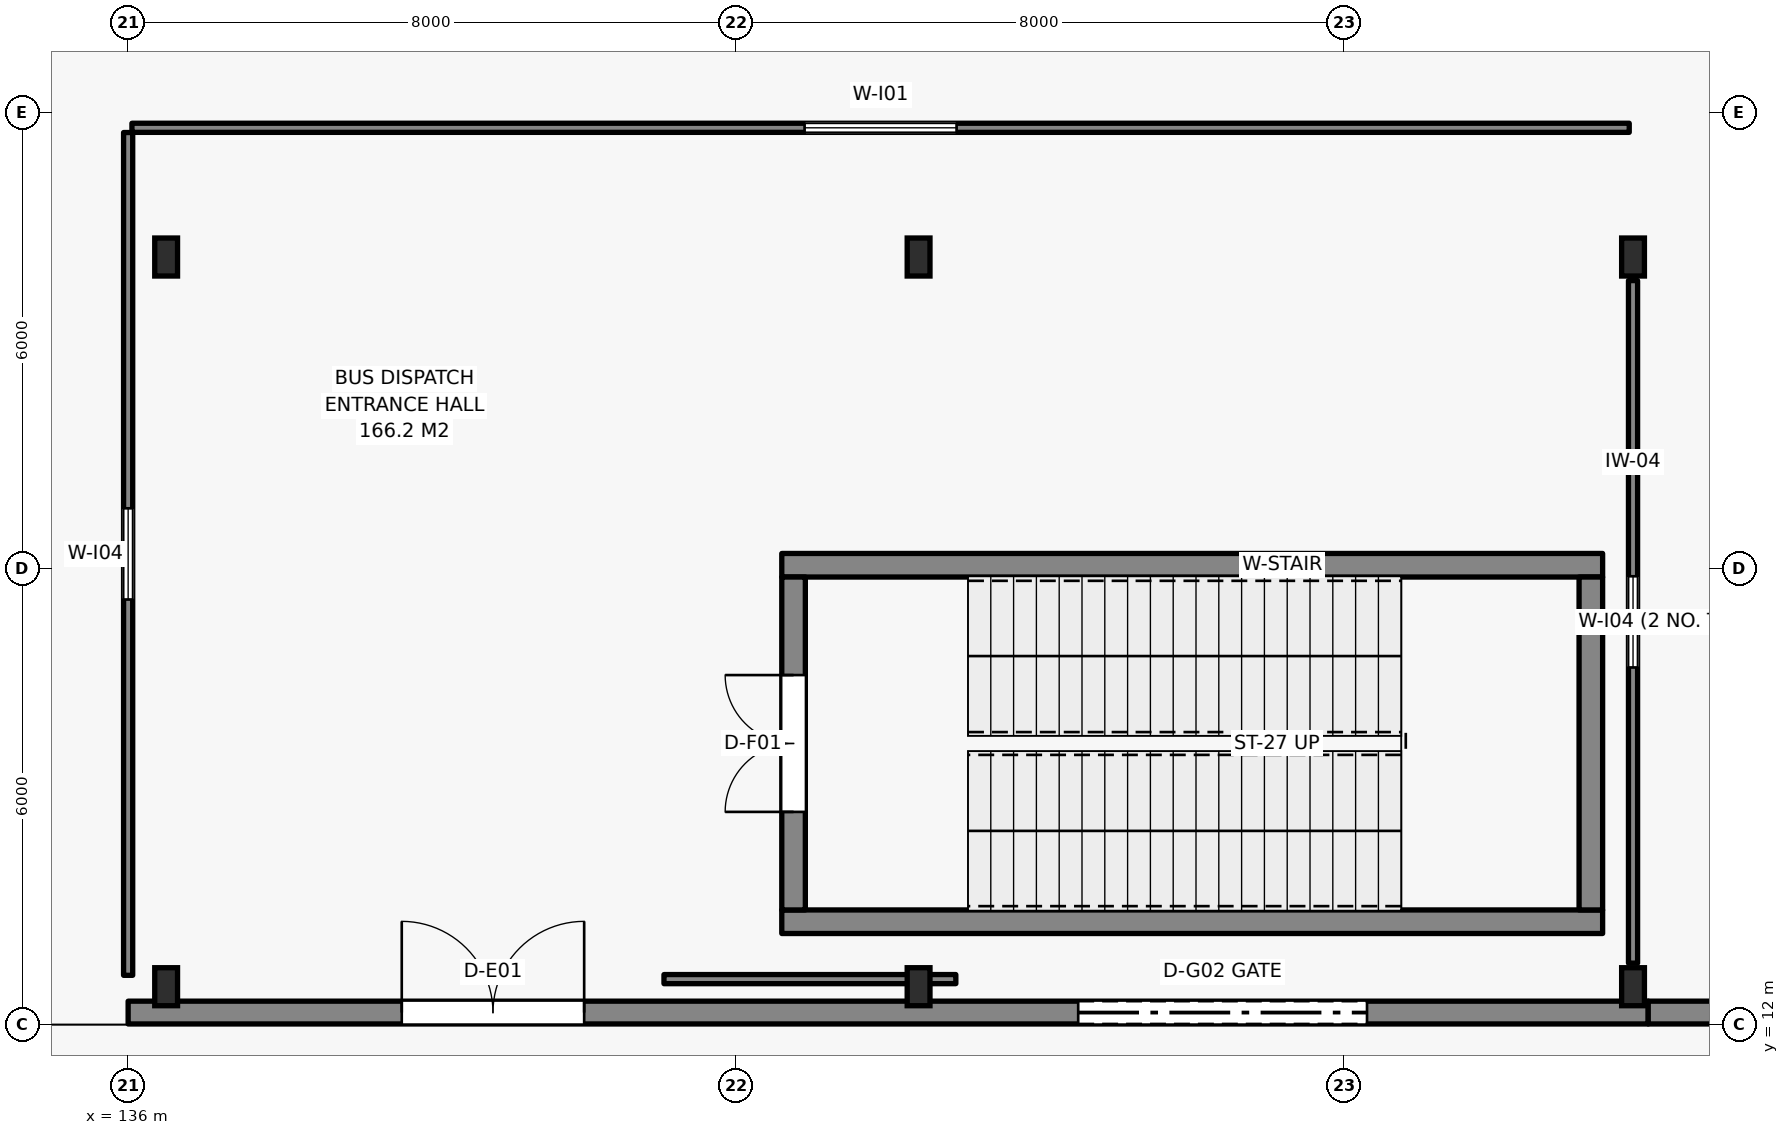
"""IFC4 building model, lengths in metres.
Left out: names, types, materials, properties, quantities, classifications, styles, units other than length and angle.
Written with IfcOpenShell. Run it as: python <this file> out.ifc"""

import sys

from ifc_helpers import new_model, si_unit, direction, frame, frame_2d, origin, origin_2d, place, context, subcontext, project, spatial, rectangle, i_section, extrude, element, fill, save


model = new_model("IFC4")
c1 = context("Model", 3, precision=1e-05, world=origin(), true_north=direction((0.0, 1.0)))
c2 = subcontext(c1, "Body", "Model", "MODEL_VIEW")
j1 = project(units=[si_unit("LENGTHUNIT", "METRE"), si_unit("PLANEANGLEUNIT", "RADIAN")], contexts=[c1])
p1 = place(None, origin())
s1 = spatial("IfcSite", under=j1, at=p1, CompositionType="ELEMENT")
p2 = place(p1, origin())
s2 = spatial("IfcBuilding", under=s1, at=p2, CompositionType="ELEMENT")
p3 = place(p2, origin())
s3 = spatial("IfcBuildingStorey", under=s2, at=p3, CompositionType="ELEMENT", Elevation=0.0)
for number, where, z_axis, x_axis in (
    (1, (144.6, 13.355, -0.4), (0.0, 0.0, 1.0), (1.0, 0.0, 0.0)),
    (2, (144.6, 18.045, -0.4), (0.0, 0.0, 1.0), (1.0, 0.0, 0.0)),
):
    element("IfcWall", number, at=place(p3, frame(where, z_axis=z_axis, x_axis=x_axis)), inside=s3, PredefinedType="SHEAR", context=c2, shape_type="SweptSolid", body=[
        extrude(rectangle(XDim=10.8, YDim=0.31, at=frame_2d((5.4, 0.0))), origin(), (0.0, 0.0, 1.0), 6.15),
    ])
p4 = place(p3, frame((144.755, 13.51, -0.4), z_axis=(0.0, 0.0, 1.0), x_axis=(0.0, 1.0, 0.0)))
e3 = element("IfcWall", 3, at=p4, inside=s3, PredefinedType="SHEAR", context=c2, shape_type="SweptSolid", body=[
    extrude(rectangle(XDim=4.38, YDim=0.31, at=frame_2d((2.19, 0.0))), origin(), (0.0, 0.0, 1.0), 6.15),
])
p5 = place(p4, frame((1.29, 0.0, 0.4)))
e4 = element("IfcOpeningElement", 4, at=p5, cuts=e3, PredefinedType="OPENING", context=c2, shape_type="SweptSolid", body=[
    extrude(rectangle(XDim=1.8, YDim=2.15, at=frame_2d((0.9, 1.075))), frame((0.0, 0.165, 0.0), z_axis=(0.0, -1.0, 0.0), x_axis=(1.0, 0.0, 0.0)), (0.0, 0.0, 1.0), 0.33),
])
p6 = place(p3, frame((155.245, 13.51, -0.4), z_axis=(0.0, 0.0, 1.0), x_axis=(0.0, 1.0, 0.0)))
e5 = element("IfcWall", 5, at=p6, inside=s3, PredefinedType="SHEAR", context=c2, shape_type="SweptSolid", body=[
    extrude(rectangle(XDim=4.38, YDim=0.31, at=frame_2d((2.19, 0.0))), origin(), (0.0, 0.0, 1.0), 6.15),
])
for number, where, z_axis, x_axis in (
    (6, (136.5, 12.5, -0.4), (0.0, 0.0, 1.0), (1.0, 0.0, 0.0)),
    (7, (136.5, 22.1, -0.4), (0.0, 0.0, 1.0), (1.0, 0.0, 0.0)),
    (8, (146.4, 12.5, -0.4), (0.0, 0.0, 1.0), (1.0, 0.0, 0.0)),
    (9, (146.4, 22.1, -0.4), (0.0, 0.0, 1.0), (1.0, 0.0, 0.0)),
    (10, (155.8, 12.5, -0.4), (0.0, 0.0, 1.0), (1.0, 0.0, 0.0)),
    (11, (155.8, 22.1, -0.4), (0.0, 0.0, 1.0), (1.0, 0.0, 0.0)),
):
    element("IfcColumn", number, at=place(p3, frame(where, z_axis=z_axis, x_axis=x_axis)), inside=s3, PredefinedType="COLUMN", context=c2, shape_type="SweptSolid", body=[
        extrude(i_section(OverallWidth=0.3, OverallDepth=0.5, WebThickness=0.014, FlangeThickness=0.028, FilletRadius=0.027, at=origin_2d()), origin(), (0.0, 0.0, 1.0), 6.4),
    ])
p7 = place(p3, frame((136.0, 12.16, 0.0), z_axis=(0.0, 0.0, 1.0), x_axis=(1.0, 0.0, 0.0)))
e12 = element("IfcWall", 12, at=p7, inside=s3, PredefinedType="SOLIDWALL", context=c2, shape_type="SweptSolid", body=[
    extrude(rectangle(XDim=20.0, YDim=0.3, at=frame_2d((10.0, 0.0))), origin(), (0.0, 0.0, 1.0), 5.74),
])
p8 = place(p7, frame((3.6, 0.0, 0.0)))
e13 = element("IfcOpeningElement", 13, at=p8, cuts=e12, PredefinedType="OPENING", context=c2, shape_type="SweptSolid", body=[
    extrude(rectangle(XDim=2.4, YDim=2.5, at=frame_2d((1.2, 1.25))), frame((0.0, 0.16, 0.0), z_axis=(0.0, -1.0, 0.0), x_axis=(1.0, 0.0, 0.0)), (0.0, 0.0, 1.0), 0.32),
])
p9 = place(p7, frame((12.5, 0.0, 0.0)))
e14 = element("IfcOpeningElement", 14, at=p9, cuts=e12, PredefinedType="OPENING", context=c2, shape_type="SweptSolid", body=[
    extrude(rectangle(XDim=3.8, YDim=3.7, at=frame_2d((1.9, 1.85))), frame((0.0, 0.16, 0.0), z_axis=(0.0, -1.0, 0.0), x_axis=(1.0, 0.0, 0.0)), (0.0, 0.0, 1.0), 0.32),
])
p10 = place(p3, frame((156.0, 12.16, 0.0), z_axis=(0.0, 0.0, 1.0), x_axis=(1.0, 0.0, 0.0)))
e15 = element("IfcWall", 15, at=p10, inside=s3, PredefinedType="SOLIDWALL", context=c2, shape_type="SweptSolid", body=[
    extrude(rectangle(XDim=8.0, YDim=0.3, at=frame_2d((4.0, 0.0))), origin(), (0.0, 0.0, 1.0), 5.74),
])
p11 = place(p10, frame((1.8, 0.0, 0.0)))
e16 = element("IfcOpeningElement", 16, at=p11, cuts=e15, PredefinedType="OPENING", context=c2, shape_type="SweptSolid", body=[
    extrude(rectangle(XDim=4.4, YDim=4.1, at=frame_2d((2.2, 2.05))), frame((0.0, 0.16, 0.0), z_axis=(0.0, -1.0, 0.0), x_axis=(1.0, 0.0, 0.0)), (0.0, 0.0, 1.0), 0.32),
])
p12 = place(p3, frame((143.05, 12.6, 0.0), z_axis=(0.0, 0.0, 1.0), x_axis=(1.0, 0.0, 0.0)))
e17 = element("IfcWall", 17, at=p12, inside=s3, PredefinedType="PARTITIONING", context=c2, shape_type="SweptSolid", body=[
    extrude(rectangle(XDim=3.84, YDim=0.12, at=frame_2d((1.92, 0.0))), origin(), (0.0, 0.0, 1.0), 4.925),
])
p13 = place(p3, frame((155.8, 12.81, 0.0), z_axis=(0.0, 0.0, 1.0), x_axis=(0.0, 1.0, 0.0)))
e18 = element("IfcWall", 18, at=p13, inside=s3, PredefinedType="PARTITIONING", context=c2, shape_type="SweptSolid", body=[
    extrude(rectangle(XDim=8.98, YDim=0.12, at=frame_2d((4.49, 0.0))), origin(), (0.0, 0.0, 1.0), 4.825),
])
p14 = place(p13, frame((3.89, 0.0, 1.05)))
e19 = element("IfcOpeningElement", 19, at=p14, cuts=e18, PredefinedType="OPENING", context=c2, shape_type="SweptSolid", body=[
    extrude(rectangle(XDim=1.2, YDim=1.1, at=frame_2d((0.6, 0.55))), frame((0.0, 0.07, 0.0), z_axis=(0.0, -1.0, 0.0), x_axis=(1.0, 0.0, 0.0)), (0.0, 0.0, 1.0), 0.14),
])
p15 = place(p3, frame((155.75, 23.8, 0.0), z_axis=(0.0, 0.0, 1.0), x_axis=(-1.0, 0.0, 0.0)))
e20 = element("IfcWall", 20, at=p15, inside=s3, PredefinedType="PARTITIONING", context=c2, shape_type="SweptSolid", body=[
    extrude(rectangle(XDim=19.7, YDim=0.12, at=frame_2d((9.85, 0.0))), origin(), (0.0, 0.0, 1.0), 4.825),
])
p16 = place(p15, frame((8.85, 0.0, 1.05)))
e21 = element("IfcOpeningElement", 21, at=p16, cuts=e20, PredefinedType="OPENING", context=c2, shape_type="SweptSolid", body=[
    extrude(rectangle(XDim=2.0, YDim=1.2, at=frame_2d((1.0, 0.6))), frame((0.0, 0.07, 0.0), z_axis=(0.0, -1.0, 0.0), x_axis=(1.0, 0.0, 0.0)), (0.0, 0.0, 1.0), 0.14),
])
p17 = place(p3, frame((136.0, 23.738, 0.0), z_axis=(0.0, 0.0, 1.0), x_axis=(0.0, -1.0, 0.0)))
e22 = element("IfcWall", 22, at=p17, inside=s3, PredefinedType="PARTITIONING", context=c2, shape_type="SweptSolid", body=[
    extrude(rectangle(XDim=11.088, YDim=0.12, at=frame_2d((5.544, 0.0))), origin(), (0.0, 0.0, 1.0), 5.72),
])
p18 = place(p17, frame((4.944, 0.0, 1.05)))
e23 = element("IfcOpeningElement", 23, at=p18, cuts=e22, PredefinedType="OPENING", context=c2, shape_type="SweptSolid", body=[
    extrude(rectangle(XDim=1.2, YDim=1.1, at=frame_2d((0.6, 0.55))), frame((0.0, 0.07, 0.0), z_axis=(0.0, -1.0, 0.0), x_axis=(1.0, 0.0, 0.0)), (0.0, 0.0, 1.0), 0.14),
])
p19 = place(p8, origin())
e24 = element("IfcDoor", 24, at=p19, inside=s3, OperationType="DOUBLE_DOOR_SINGLE_SWING", PredefinedType="DOOR", context=c2, shape_type="SweptSolid", body=[
    extrude(rectangle(XDim=2.4, YDim=2.5, at=frame_2d((1.2, 1.25))), frame((0.0, 0.025, 0.0), z_axis=(0.0, -1.0, 0.0), x_axis=(1.0, 0.0, 0.0)), (0.0, 0.0, 1.0), 0.05),
])
fill(e13, e24)
p20 = place(p9, origin())
e25 = element("IfcDoor", 25, at=p20, inside=s3, OperationType="ROLLINGUP", PredefinedType="GATE", context=c2, shape_type="SweptSolid", body=[
    extrude(rectangle(XDim=3.8, YDim=3.7, at=frame_2d((1.9, 1.85))), frame((0.0, 0.025, 0.0), z_axis=(0.0, -1.0, 0.0), x_axis=(1.0, 0.0, 0.0)), (0.0, 0.0, 1.0), 0.05),
])
fill(e14, e25)
p21 = place(p5, origin())
e26 = element("IfcDoor", 26, at=p21, inside=s3, OperationType="DOUBLE_DOOR_SINGLE_SWING", PredefinedType="DOOR", context=c2, shape_type="SweptSolid", body=[
    extrude(rectangle(XDim=1.8, YDim=2.15, at=frame_2d((0.9, 1.075))), frame((0.0, 0.025, 0.0), z_axis=(0.0, -1.0, 0.0), x_axis=(1.0, 0.0, 0.0)), (0.0, 0.0, 1.0), 0.05),
])
fill(e4, e26)
p22 = place(p14, origin())
e27 = element("IfcWindow", 27, at=p22, inside=s3, PartitioningType="SINGLE_PANEL", PredefinedType="WINDOW", context=c2, shape_type="SweptSolid", body=[
    extrude(rectangle(XDim=1.2, YDim=1.1, at=frame_2d((0.6, 0.55))), frame((0.0, 0.03, 0.0), z_axis=(0.0, -1.0, 0.0), x_axis=(1.0, 0.0, 0.0)), (0.0, 0.0, 1.0), 0.06),
])
fill(e19, e27)
p23 = place(p16, origin())
e28 = element("IfcWindow", 28, at=p23, inside=s3, PartitioningType="SINGLE_PANEL", PredefinedType="WINDOW", context=c2, shape_type="SweptSolid", body=[
    extrude(rectangle(XDim=2.0, YDim=1.2, at=frame_2d((1.0, 0.6))), frame((0.0, 0.03, 0.0), z_axis=(0.0, -1.0, 0.0), x_axis=(1.0, 0.0, 0.0)), (0.0, 0.0, 1.0), 0.06),
])
fill(e21, e28)
p24 = place(p18, origin())
e29 = element("IfcWindow", 29, at=p24, inside=s3, PartitioningType="SINGLE_PANEL", PredefinedType="WINDOW", context=c2, shape_type="SweptSolid", body=[
    extrude(rectangle(XDim=1.2, YDim=1.1, at=frame_2d((0.6, 0.55))), frame((0.0, 0.03, 0.0), z_axis=(0.0, -1.0, 0.0), x_axis=(1.0, 0.0, 0.0)), (0.0, 0.0, 1.0), 0.06),
])
fill(e23, e29)
save(model, sys.argv[1])
